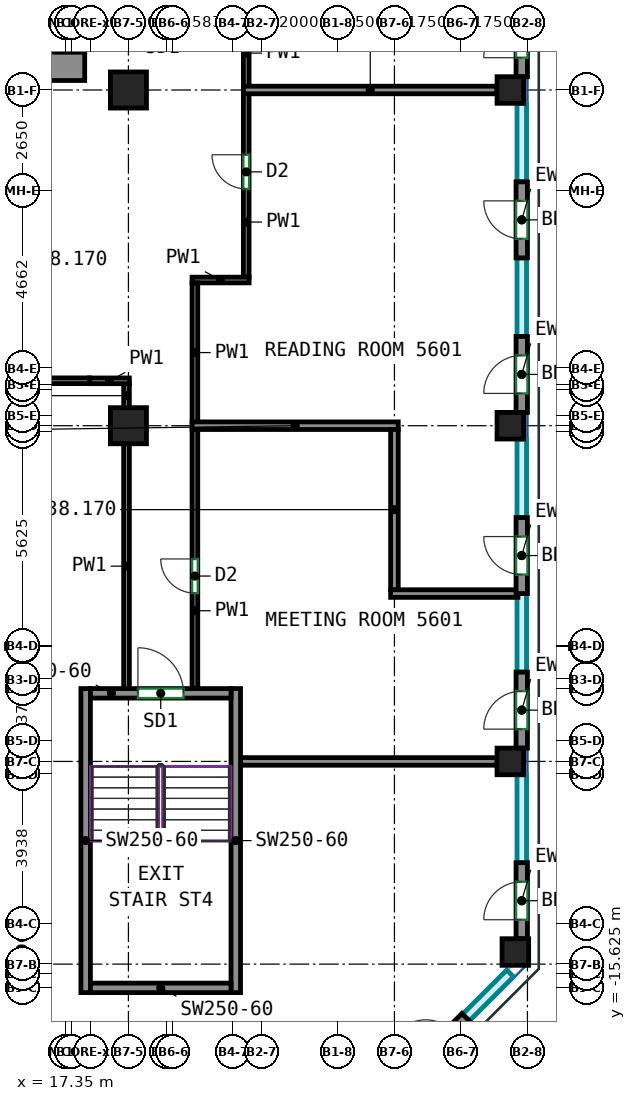
"""IFC4 building model, lengths in metres.
Left out: names, types, materials, properties, quantities, classifications, styles, units other than length and angle.
Written with IfcOpenShell. Run it as: python <this file> out.ifc"""

import sys

from ifc_helpers import new_model, si_unit, direction, frame, frame_2d, origin, origin_2d, place, context, subcontext, project, spatial, rectangle, extrude, source, transform, mapped, element, fill, save


model = new_model("IFC4")
c1 = context("Model", 3, precision=1e-05, world=origin(), true_north=direction((0.0, 1.0)))
c2 = subcontext(c1, "Body", "Model", "MODEL_VIEW")
j1 = project(units=[si_unit("LENGTHUNIT", "METRE"), si_unit("PLANEANGLEUNIT", "RADIAN")], contexts=[c1])
p1 = place(None, origin())
s1 = spatial("IfcSite", under=j1, at=p1, CompositionType="ELEMENT")
p2 = place(p1, origin())
s2 = spatial("IfcBuilding", under=s1, at=p2, CompositionType="ELEMENT")
p3 = place(p2, frame((0.0, 0.0, 233.6)))
s3 = spatial("IfcBuildingStorey", under=s2, at=p3, CompositionType="ELEMENT", Elevation=233.6)
m1 = source(origin(), c2, "Body", "SweptSolid", [
    extrude(rectangle(XDim=0.95, YDim=0.95, at=origin_2d()), origin(), (0.0, 0.0, 1.0), 5.12),
])
for number, where, z_axis, x_axis in (
    (1, (19.0, -0.833, 0.0), (0.0, 0.0, 1.0), (1.0, 0.0, 0.0)),
    (2, (19.0, 8.0, 0.0), (0.0, 0.0, 1.0), (1.0, 0.0, 0.0)),
):
    element("IfcColumn", number, at=place(p3, frame(where, z_axis=z_axis, x_axis=x_axis)), inside=s3, PredefinedType="COLUMN", context=c2, shape_type="MappedRepresentation", body=[
        mapped(m1, transform((0.0, 0.0, 0.0))),
    ])
m2 = source(origin(), c2, "Body", "SweptSolid", [
    extrude(rectangle(XDim=0.7, YDim=0.7, at=origin_2d()), origin(), (0.0, 0.0, 1.0), 5.12),
])
for number, where, z_axis, x_axis in (
    (3, (29.05, -9.667, 0.0), (0.0, 0.0, 1.0), (1.0, 0.0, 0.0)),
    (4, (29.05, -0.833, 0.0), (0.0, 0.0, 1.0), (1.0, 0.0, 0.0)),
    (5, (29.05, 8.0, 0.0), (0.0, 0.0, 1.0), (1.0, 0.0, 0.0)),
    (6, (29.182, -14.682, 0.0), (0.0, 0.0, 1.0), (1.0, 0.0, 0.0)),
):
    element("IfcColumn", number, at=place(p3, frame(where, z_axis=z_axis, x_axis=x_axis)), inside=s3, PredefinedType="COLUMN", context=c2, shape_type="MappedRepresentation", body=[
        mapped(m2, transform((0.0, 0.0, 0.0))),
    ])
m3 = source(origin(), c2, "Body", "SweptSolid", [
    extrude(rectangle(XDim=5.38, YDim=0.75, at=frame_2d((2.69, 0.0))), origin(), (0.0, 0.0, 1.0), 5.12),
])
p4 = place(p3, frame((12.47, 8.625, 0.0), z_axis=(0.0, 0.0, 1.0), x_axis=(1.0, 0.0, 0.0)))
e7 = element("IfcWall", 7, at=p4, inside=s3, PredefinedType="SHEAR", context=c2, shape_type="MappedRepresentation", body=[
    mapped(m3, transform((0.0, 0.0, 0.0))),
])
p5 = place(p4, frame((2.18, 0.0, 0.0)))
e8 = element("IfcOpeningElement", 8, at=p5, cuts=e7, PredefinedType="OPENING", context=c2, shape_type="SweptSolid", body=[
    extrude(rectangle(XDim=1.2, YDim=2.1, at=frame_2d((0.6, 1.05))), frame((0.0, 0.385, 0.0), z_axis=(0.0, -1.0, 0.0), x_axis=(1.0, 0.0, 0.0)), (0.0, 0.0, 1.0), 0.77),
])
m4 = source(origin(), c2, "Body", "SweptSolid", [
    extrude(rectangle(XDim=8.0, YDim=0.25, at=frame_2d((4.0, 0.0))), origin(), (0.0, 0.0, 1.0), 5.12),
])
for number, where, z_axis, x_axis in (
    (9, (17.875, -15.75, 0.0), (0.0, 0.0, 1.0), (0.0, 1.0, 0.0)),
    (10, (21.825, -15.75, 0.0), (0.0, 0.0, 1.0), (0.0, 1.0, 0.0)),
):
    element("IfcWall", number, at=place(p3, frame(where, z_axis=z_axis, x_axis=x_axis)), inside=s3, PredefinedType="SHEAR", context=c2, shape_type="MappedRepresentation", body=[
        mapped(m4, transform((0.0, 0.0, 0.0))),
    ])
m5 = source(origin(), c2, "Body", "SweptSolid", [
    extrude(rectangle(XDim=3.7, YDim=0.25, at=frame_2d((1.85, 0.0))), origin(), (0.0, 0.0, 1.0), 5.12),
])
p6 = place(p3, frame((18.0, -15.625, 0.0), z_axis=(0.0, 0.0, 1.0), x_axis=(1.0, 0.0, 0.0)))
e11 = element("IfcWall", 11, at=p6, inside=s3, PredefinedType="SHEAR", context=c2, shape_type="MappedRepresentation", body=[
    mapped(m5, transform((0.0, 0.0, 0.0))),
])
p7 = place(p3, frame((18.0, -7.875, 0.0), z_axis=(0.0, 0.0, 1.0), x_axis=(1.0, 0.0, 0.0)))
e12 = element("IfcWall", 12, at=p7, inside=s3, PredefinedType="SHEAR", context=c2, shape_type="MappedRepresentation", body=[
    mapped(m5, transform((0.0, 0.0, 0.0))),
])
p8 = place(p7, frame((1.25, 0.0, 0.0)))
e13 = element("IfcOpeningElement", 13, at=p8, cuts=e12, PredefinedType="OPENING", context=c2, shape_type="SweptSolid", body=[
    extrude(rectangle(XDim=1.2, YDim=2.1, at=frame_2d((0.6, 1.05))), frame((0.0, 0.135, 0.0), z_axis=(0.0, -1.0, 0.0), x_axis=(1.0, 0.0, 0.0)), (0.0, 0.0, 1.0), 0.27),
])
m6 = source(origin(), c2, "Body", "SweptSolid", [
    extrude(rectangle(XDim=2.0, YDim=0.3, at=frame_2d((1.0, 0.0))), origin(), (0.0, 0.0, 1.0), 5.12),
])
p9 = place(p3, frame((26.469, -17.819, 0.0), z_axis=(0.0, 0.0, 1.0), x_axis=(0.70716781496, 0.707045742145, 0.0)))
e14 = element("IfcWall", 14, at=p9, inside=s3, PredefinedType="SOLIDWALL", context=c2, shape_type="MappedRepresentation", body=[
    mapped(m6, transform((0.0, 0.0, 0.0))),
])
p10 = place(p9, frame((0.5, 0.0, 0.0)))
e15 = element("IfcOpeningElement", 15, at=p10, cuts=e14, PredefinedType="OPENING", context=c2, shape_type="SweptSolid", body=[
    extrude(rectangle(XDim=1.0, YDim=2.1, at=frame_2d((0.5, 1.05))), frame((0.0, 0.16, 0.0), z_axis=(0.0, -1.0, 0.0), x_axis=(1.0, 0.0, 0.0)), (0.0, 0.0, 1.0), 0.32),
])
p11 = place(p3, frame((29.35, -14.332, 0.0), z_axis=(0.0, 0.0, 1.0), x_axis=(0.0, 1.0, 0.0)))
e16 = element("IfcWall", 16, at=p11, inside=s3, PredefinedType="SOLIDWALL", context=c2, shape_type="MappedRepresentation", body=[
    mapped(m6, transform((0.0, 0.0, 0.0))),
])
p12 = place(p11, frame((0.5, 0.0, 0.0)))
e17 = element("IfcOpeningElement", 17, at=p12, cuts=e16, PredefinedType="OPENING", context=c2, shape_type="SweptSolid", body=[
    extrude(rectangle(XDim=1.0, YDim=2.1, at=frame_2d((0.5, 1.05))), frame((0.0, 0.16, 0.0), z_axis=(0.0, -1.0, 0.0), x_axis=(1.0, 0.0, 0.0)), (0.0, 0.0, 1.0), 0.32),
])
p13 = place(p3, frame((29.35, -9.317, 0.0), z_axis=(0.0, 0.0, 1.0), x_axis=(0.0, 1.0, 0.0)))
e18 = element("IfcWall", 18, at=p13, inside=s3, PredefinedType="SOLIDWALL", context=c2, shape_type="MappedRepresentation", body=[
    mapped(m6, transform((0.0, 0.0, 0.0))),
])
p14 = place(p13, frame((0.5, 0.0, 0.0)))
e19 = element("IfcOpeningElement", 19, at=p14, cuts=e18, PredefinedType="OPENING", context=c2, shape_type="SweptSolid", body=[
    extrude(rectangle(XDim=1.0, YDim=2.1, at=frame_2d((0.5, 1.05))), frame((0.0, 0.16, 0.0), z_axis=(0.0, -1.0, 0.0), x_axis=(1.0, 0.0, 0.0)), (0.0, 0.0, 1.0), 0.32),
])
p15 = place(p3, frame((29.35, -5.25, 0.0), z_axis=(0.0, 0.0, 1.0), x_axis=(0.0, 1.0, 0.0)))
e20 = element("IfcWall", 20, at=p15, inside=s3, PredefinedType="SOLIDWALL", context=c2, shape_type="MappedRepresentation", body=[
    mapped(m6, transform((0.0, 0.0, 0.0))),
])
p16 = place(p15, frame((0.5, 0.0, 0.0)))
e21 = element("IfcOpeningElement", 21, at=p16, cuts=e20, PredefinedType="OPENING", context=c2, shape_type="SweptSolid", body=[
    extrude(rectangle(XDim=1.0, YDim=2.1, at=frame_2d((0.5, 1.05))), frame((0.0, 0.16, 0.0), z_axis=(0.0, -1.0, 0.0), x_axis=(1.0, 0.0, 0.0)), (0.0, 0.0, 1.0), 0.32),
])
p17 = place(p3, frame((29.35, -0.483, 0.0), z_axis=(0.0, 0.0, 1.0), x_axis=(0.0, 1.0, 0.0)))
e22 = element("IfcWall", 22, at=p17, inside=s3, PredefinedType="SOLIDWALL", context=c2, shape_type="MappedRepresentation", body=[
    mapped(m6, transform((0.0, 0.0, 0.0))),
])
p18 = place(p17, frame((0.5, 0.0, 0.0)))
e23 = element("IfcOpeningElement", 23, at=p18, cuts=e22, PredefinedType="OPENING", context=c2, shape_type="SweptSolid", body=[
    extrude(rectangle(XDim=1.0, YDim=2.1, at=frame_2d((0.5, 1.05))), frame((0.0, 0.16, 0.0), z_axis=(0.0, -1.0, 0.0), x_axis=(1.0, 0.0, 0.0)), (0.0, 0.0, 1.0), 0.32),
])
p19 = place(p3, frame((29.35, 3.583, 0.0), z_axis=(0.0, 0.0, 1.0), x_axis=(0.0, 1.0, 0.0)))
e24 = element("IfcWall", 24, at=p19, inside=s3, PredefinedType="SOLIDWALL", context=c2, shape_type="MappedRepresentation", body=[
    mapped(m6, transform((0.0, 0.0, 0.0))),
])
p20 = place(p19, frame((0.5, 0.0, 0.0)))
e25 = element("IfcOpeningElement", 25, at=p20, cuts=e24, PredefinedType="OPENING", context=c2, shape_type="SweptSolid", body=[
    extrude(rectangle(XDim=1.0, YDim=2.1, at=frame_2d((0.5, 1.05))), frame((0.0, 0.16, 0.0), z_axis=(0.0, -1.0, 0.0), x_axis=(1.0, 0.0, 0.0)), (0.0, 0.0, 1.0), 0.32),
])
p21 = place(p3, frame((29.35, 8.35, 0.0), z_axis=(0.0, 0.0, 1.0), x_axis=(0.0, 1.0, 0.0)))
e26 = element("IfcWall", 26, at=p21, inside=s3, PredefinedType="SOLIDWALL", context=c2, shape_type="MappedRepresentation", body=[
    mapped(m6, transform((0.0, 0.0, 0.0))),
])
p22 = place(p21, frame((0.5, 0.0, 0.0)))
e27 = element("IfcOpeningElement", 27, at=p22, cuts=e26, PredefinedType="OPENING", context=c2, shape_type="SweptSolid", body=[
    extrude(rectangle(XDim=1.0, YDim=2.1, at=frame_2d((0.5, 1.05))), frame((0.0, 0.16, 0.0), z_axis=(0.0, -1.0, 0.0), x_axis=(1.0, 0.0, 0.0)), (0.0, 0.0, 1.0), 0.32),
])
p23 = place(p3, frame((7.405, 0.35, 0.0), z_axis=(0.0, 0.0, 1.0), x_axis=(1.0, 0.0, 0.0)))
e28 = element("IfcWall", 28, at=p23, inside=s3, PredefinedType="PARTITIONING", context=c2, shape_type="SweptSolid", body=[
    extrude(rectangle(XDim=10.574, YDim=0.15, at=frame_2d((5.287, 0.0))), origin(), (0.0, 0.0, 1.0), 5.12),
])
p24 = place(p23, frame((6.651, 0.0, 0.0)))
e29 = element("IfcOpeningElement", 29, at=p24, cuts=e28, PredefinedType="OPENING", context=c2, shape_type="SweptSolid", body=[
    extrude(rectangle(XDim=1.8, YDim=2.1, at=frame_2d((0.9, 1.05))), frame((0.0, 0.085, 0.0), z_axis=(0.0, -1.0, 0.0), x_axis=(1.0, 0.0, 0.0)), (0.0, 0.0, 1.0), 0.17),
])
p25 = place(p3, frame((18.95, -7.75, 0.0), z_axis=(0.0, 0.0, 1.0), x_axis=(0.0, 1.0, 0.0)))
e30 = element("IfcWall", 30, at=p25, inside=s3, PredefinedType="PARTITIONING", context=c2, shape_type="SweptSolid", body=[
    extrude(rectangle(XDim=6.442, YDim=0.15, at=frame_2d((3.221, 0.0))), origin(), (0.0, 0.0, 1.0), 5.12),
])
p26 = place(p3, frame((18.95, -0.358, 0.0), z_axis=(0.0, 0.0, 1.0), x_axis=(0.0, 1.0, 0.0)))
e31 = element("IfcWall", 31, at=p26, inside=s3, PredefinedType="PARTITIONING", context=c2, shape_type="SweptSolid", body=[
    extrude(rectangle(XDim=0.631, YDim=0.15, at=frame_2d((0.315, 0.0))), origin(), (0.0, 0.0, 1.0), 4.57),
])
p27 = place(p3, frame((17.981, 0.348, 0.0), z_axis=(0.0, 0.0, 1.0), x_axis=(1.0, 0.0, 0.0)))
e32 = element("IfcWall", 32, at=p27, inside=s3, PredefinedType="PARTITIONING", context=c2, shape_type="SweptSolid", body=[
    extrude(rectangle(XDim=1.044, YDim=0.15, at=frame_2d((0.522, 0.0))), origin(), (0.0, 0.0, 1.0), 5.12),
])
p28 = place(p3, frame((20.75, -7.75, 0.0), z_axis=(0.0, 0.0, 1.0), x_axis=(0.0, 1.0, 0.0)))
e33 = element("IfcWall", 33, at=p28, inside=s3, PredefinedType="PARTITIONING", context=c2, shape_type="SweptSolid", body=[
    extrude(rectangle(XDim=6.827, YDim=0.15, at=frame_2d((3.414, 0.0))), origin(), (0.0, 0.0, 1.0), 5.12),
])
p29 = place(p28, frame((2.511, 0.0, 0.0)))
e34 = element("IfcOpeningElement", 34, at=p29, cuts=e33, PredefinedType="OPENING", context=c2, shape_type="SweptSolid", body=[
    extrude(rectangle(XDim=0.9, YDim=2.1, at=frame_2d((0.45, 1.05))), frame((0.0, 0.085, 0.0), z_axis=(0.0, -1.0, 0.0), x_axis=(1.0, 0.0, 0.0)), (0.0, 0.0, 1.0), 0.17),
])
p30 = place(p3, frame((22.1, 3.075, 0.0), z_axis=(0.0, 0.0, 1.0), x_axis=(0.0, 1.0, 0.0)))
e35 = element("IfcWall", 35, at=p30, inside=s3, PredefinedType="PARTITIONING", context=c2, shape_type="SweptSolid", body=[
    extrude(rectangle(XDim=4.835, YDim=0.15, at=frame_2d((2.417, 0.0))), origin(), (0.0, 0.0, 1.0), 5.12),
])
p31 = place(p30, frame((2.321, 0.0, 0.0)))
e36 = element("IfcOpeningElement", 36, at=p31, cuts=e35, PredefinedType="OPENING", context=c2, shape_type="SweptSolid", body=[
    extrude(rectangle(XDim=0.9, YDim=2.1, at=frame_2d((0.45, 1.05))), frame((0.0, 0.085, 0.0), z_axis=(0.0, -1.0, 0.0), x_axis=(1.0, 0.0, 0.0)), (0.0, 0.0, 1.0), 0.17),
])
p32 = place(p3, frame((20.675, 3.0, 0.0), z_axis=(0.0, 0.0, 1.0), x_axis=(1.0, 0.0, 0.0)))
e37 = element("IfcWall", 37, at=p32, inside=s3, PredefinedType="PARTITIONING", context=c2, shape_type="SweptSolid", body=[
    extrude(rectangle(XDim=1.5, YDim=0.15, at=frame_2d((0.75, 0.0))), origin(), (0.0, 0.0, 1.0), 5.12),
])
p33 = place(p3, frame((20.75, -0.743, 0.0), z_axis=(0.0, 0.0, 1.0), x_axis=(0.0, 1.0, 0.0)))
e38 = element("IfcWall", 38, at=p33, inside=s3, PredefinedType="PARTITIONING", context=c2, shape_type="SweptSolid", body=[
    extrude(rectangle(XDim=3.668, YDim=0.15, at=frame_2d((1.834, 0.0))), origin(), (0.0, 0.0, 1.0), 5.12),
])
p34 = place(p3, frame((22.1, 8.09, 0.0), z_axis=(0.0, 0.0, 1.0), x_axis=(0.0, 1.0, 0.0)))
e39 = element("IfcWall", 39, at=p34, inside=s3, PredefinedType="PARTITIONING", context=c2, shape_type="SweptSolid", body=[
    extrude(rectangle(XDim=1.76, YDim=0.15, at=frame_2d((0.88, 0.0))), origin(), (0.0, 0.0, 1.0), 5.12),
])
p35 = place(p3, frame((28.7, -9.667, 0.0), z_axis=(0.0, 0.0, 1.0), x_axis=(-1.0, 0.0, 0.0)))
e40 = element("IfcWall", 40, at=p35, inside=s3, PredefinedType="PARTITIONING", context=c2, shape_type="SweptSolid", body=[
    extrude(rectangle(XDim=6.75, YDim=0.2, at=frame_2d((3.375, 0.0))), origin(), (0.0, 0.0, 1.0), 5.12),
])
p36 = place(p3, frame((26.1, -0.833, 0.0), z_axis=(0.0, 0.0, 1.0), x_axis=(-1.0, 0.0, 0.0)))
e41 = element("IfcWall", 41, at=p36, inside=s3, PredefinedType="PARTITIONING", context=c2, shape_type="SweptSolid", body=[
    extrude(rectangle(XDim=5.423, YDim=0.2, at=frame_2d((2.711, 0.0))), origin(), (0.0, 0.0, 1.0), 4.57),
])
p37 = place(p3, frame((26.0, -5.15, 0.0), z_axis=(0.0, 0.0, 1.0), x_axis=(0.0, 1.0, 0.0)))
e42 = element("IfcWall", 42, at=p37, inside=s3, PredefinedType="PARTITIONING", context=c2, shape_type="SweptSolid", body=[
    extrude(rectangle(XDim=4.217, YDim=0.2, at=frame_2d((2.108, 0.0))), origin(), (0.0, 0.0, 1.0), 4.57),
])
p38 = place(p3, frame((25.9, -5.25, 0.0), z_axis=(0.0, 0.0, 1.0), x_axis=(1.0, 0.0, 0.0)))
e43 = element("IfcWall", 43, at=p38, inside=s3, PredefinedType="PARTITIONING", context=c2, shape_type="SweptSolid", body=[
    extrude(rectangle(XDim=3.35, YDim=0.2, at=frame_2d((1.675, 0.0))), origin(), (0.0, 0.0, 1.0), 5.12),
])
p39 = place(p3, frame((28.7, 8.0, 0.0), z_axis=(0.0, 0.0, 1.0), x_axis=(-1.0, 0.0, 0.0)))
e44 = element("IfcWall", 44, at=p39, inside=s3, PredefinedType="PARTITIONING", context=c2, shape_type="SweptSolid", body=[
    extrude(rectangle(XDim=6.673, YDim=0.2, at=frame_2d((3.336, 0.0))), origin(), (0.0, 0.0, 1.0), 4.57),
])
p40 = place(p12, origin())
e45 = element("IfcDoor", 45, at=p40, inside=s3, OperationType="SINGLE_SWING_LEFT", PredefinedType="DOOR", context=c2, shape_type="SweptSolid", body=[
    extrude(rectangle(XDim=1.0, YDim=2.1, at=frame_2d((0.5, 1.05))), frame((0.0, 0.025, 0.0), z_axis=(0.0, -1.0, 0.0), x_axis=(1.0, 0.0, 0.0)), (0.0, 0.0, 1.0), 0.05),
])
fill(e17, e45)
p41 = place(p14, origin())
e46 = element("IfcDoor", 46, at=p41, inside=s3, OperationType="SINGLE_SWING_LEFT", PredefinedType="DOOR", context=c2, shape_type="SweptSolid", body=[
    extrude(rectangle(XDim=1.0, YDim=2.1, at=frame_2d((0.5, 1.05))), frame((0.0, 0.025, 0.0), z_axis=(0.0, -1.0, 0.0), x_axis=(1.0, 0.0, 0.0)), (0.0, 0.0, 1.0), 0.05),
])
fill(e19, e46)
p42 = place(p16, origin())
e47 = element("IfcDoor", 47, at=p42, inside=s3, OperationType="SINGLE_SWING_RIGHT", PredefinedType="DOOR", context=c2, shape_type="SweptSolid", body=[
    extrude(rectangle(XDim=1.0, YDim=2.1, at=frame_2d((0.5, 1.05))), frame((0.0, 0.025, 0.0), z_axis=(0.0, -1.0, 0.0), x_axis=(1.0, 0.0, 0.0)), (0.0, 0.0, 1.0), 0.05),
])
fill(e21, e47)
p43 = place(p18, origin())
e48 = element("IfcDoor", 48, at=p43, inside=s3, OperationType="SINGLE_SWING_LEFT", PredefinedType="DOOR", context=c2, shape_type="SweptSolid", body=[
    extrude(rectangle(XDim=1.0, YDim=2.1, at=frame_2d((0.5, 1.05))), frame((0.0, 0.025, 0.0), z_axis=(0.0, -1.0, 0.0), x_axis=(1.0, 0.0, 0.0)), (0.0, 0.0, 1.0), 0.05),
])
fill(e23, e48)
p44 = place(p20, origin())
e49 = element("IfcDoor", 49, at=p44, inside=s3, OperationType="SINGLE_SWING_RIGHT", PredefinedType="DOOR", context=c2, shape_type="SweptSolid", body=[
    extrude(rectangle(XDim=1.0, YDim=2.1, at=frame_2d((0.5, 1.05))), frame((0.0, 0.025, 0.0), z_axis=(0.0, -1.0, 0.0), x_axis=(1.0, 0.0, 0.0)), (0.0, 0.0, 1.0), 0.05),
])
fill(e25, e49)
p45 = place(p22, origin())
e50 = element("IfcDoor", 50, at=p45, inside=s3, OperationType="SINGLE_SWING_LEFT", PredefinedType="DOOR", context=c2, shape_type="SweptSolid", body=[
    extrude(rectangle(XDim=1.0, YDim=2.1, at=frame_2d((0.5, 1.05))), frame((0.0, 0.025, 0.0), z_axis=(0.0, -1.0, 0.0), x_axis=(1.0, 0.0, 0.0)), (0.0, 0.0, 1.0), 0.05),
])
fill(e27, e50)
p46 = place(p8, origin())
e51 = element("IfcDoor", 51, at=p46, inside=s3, OperationType="DOUBLE_DOOR_SINGLE_SWING", PredefinedType="DOOR", context=c2, shape_type="SweptSolid", body=[
    extrude(rectangle(XDim=1.2, YDim=2.1, at=frame_2d((0.6, 1.05))), frame((0.0, 0.025, 0.0), z_axis=(0.0, -1.0, 0.0), x_axis=(1.0, 0.0, 0.0)), (0.0, 0.0, 1.0), 0.05),
])
fill(e13, e51)
p47 = place(p29, origin())
e52 = element("IfcDoor", 52, at=p47, inside=s3, OperationType="SINGLE_SWING_RIGHT", PredefinedType="DOOR", context=c2, shape_type="SweptSolid", body=[
    extrude(rectangle(XDim=0.9, YDim=2.1, at=frame_2d((0.45, 1.05))), frame((0.0, 0.025, 0.0), z_axis=(0.0, -1.0, 0.0), x_axis=(1.0, 0.0, 0.0)), (0.0, 0.0, 1.0), 0.05),
])
fill(e34, e52)
p48 = place(p31, origin())
e53 = element("IfcDoor", 53, at=p48, inside=s3, OperationType="SINGLE_SWING_RIGHT", PredefinedType="DOOR", context=c2, shape_type="SweptSolid", body=[
    extrude(rectangle(XDim=0.9, YDim=2.1, at=frame_2d((0.45, 1.05))), frame((0.0, 0.025, 0.0), z_axis=(0.0, -1.0, 0.0), x_axis=(1.0, 0.0, 0.0)), (0.0, 0.0, 1.0), 0.05),
])
fill(e36, e53)
save(model, sys.argv[1])
